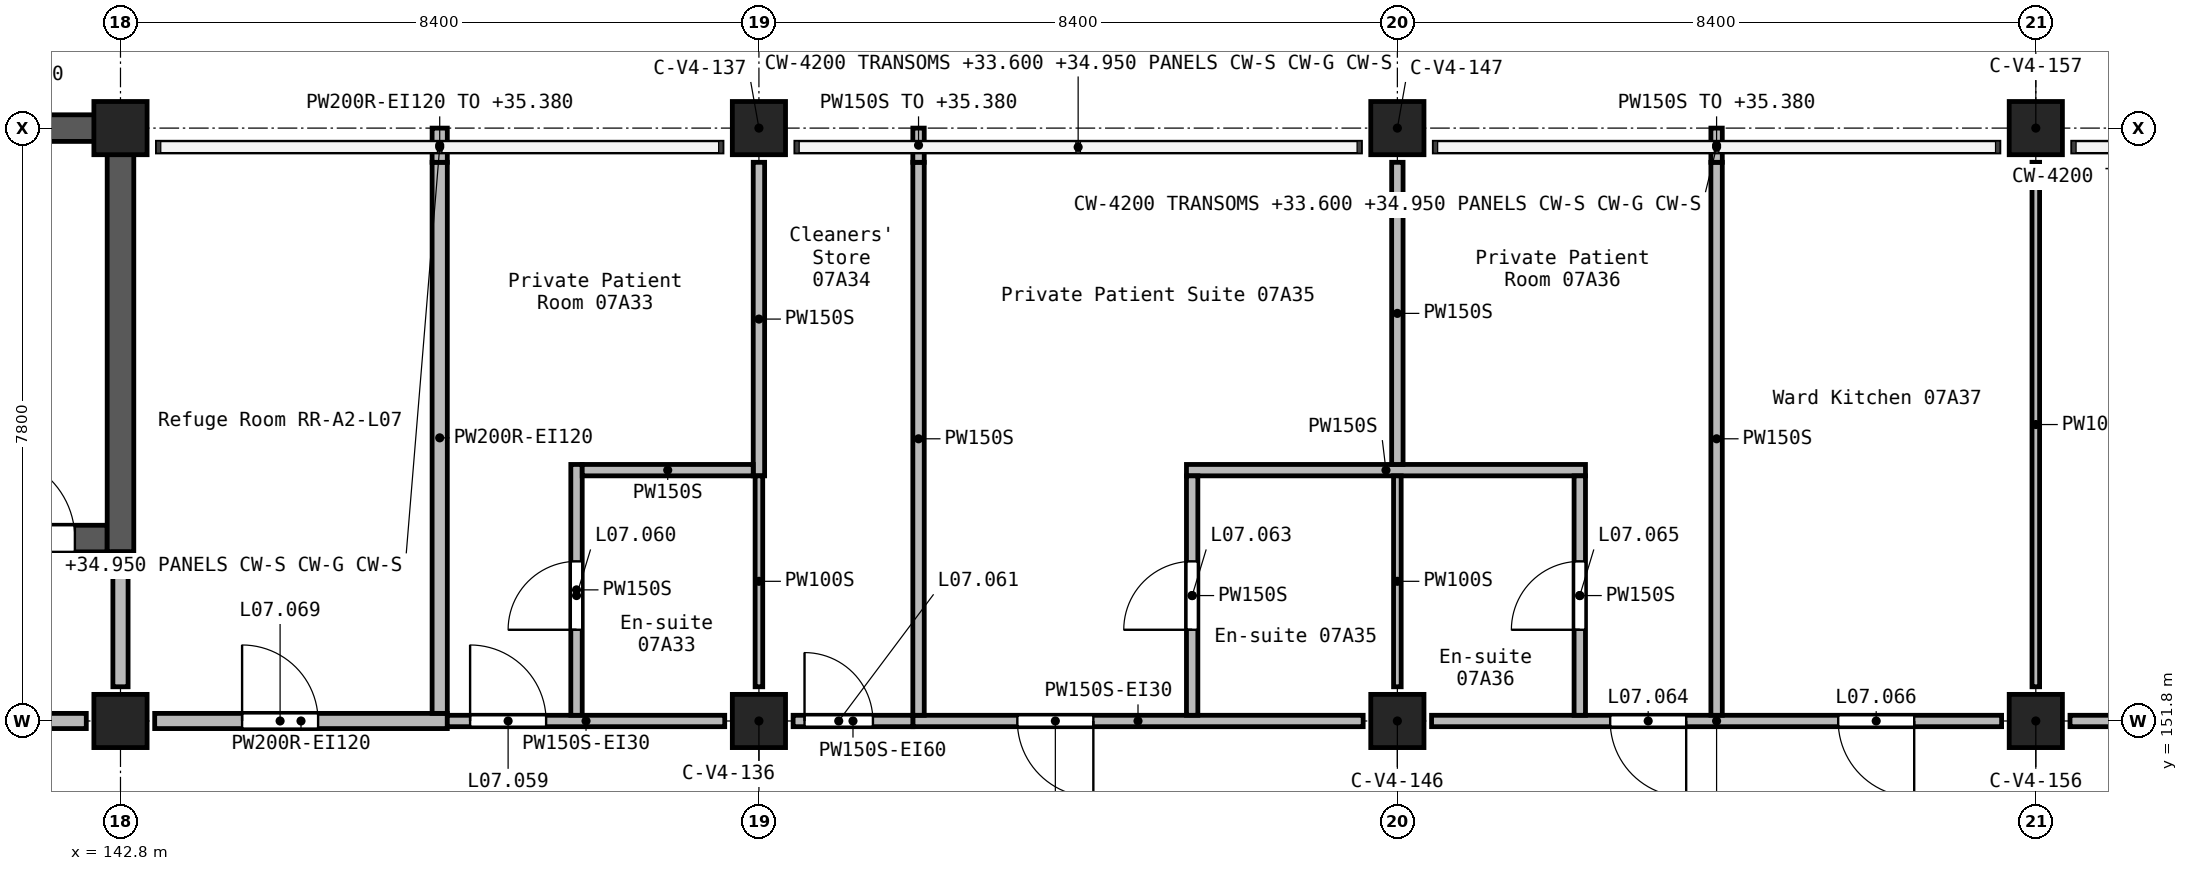
"""IFC4 building model, lengths in metres.
Left out: names, types, materials, properties, quantities, classifications, styles, units other than length and angle.
Written with IfcOpenShell. Run it as: python <this file> out.ifc"""

import sys

from ifc_helpers import new_model, si_unit, direction, frame, frame_2d, origin, origin_2d, place, context, subcontext, project, spatial, rectangle, extrude, element, fill, save


model = new_model("IFC4")
c1 = context("Model", 3, precision=1e-05, world=origin(), true_north=direction((0.0, 1.0)))
c2 = subcontext(c1, "Body", "Model", "MODEL_VIEW")
j1 = project(units=[si_unit("LENGTHUNIT", "METRE"), si_unit("PLANEANGLEUNIT", "RADIAN")], contexts=[c1])
p1 = place(None, origin())
s1 = spatial("IfcSite", under=j1, at=p1, CompositionType="ELEMENT")
p2 = place(p1, origin())
s2 = spatial("IfcBuilding", under=s1, at=p2, CompositionType="ELEMENT")
p3 = place(p2, frame((0.0, 0.0, 32.7)))
s3 = spatial("IfcBuildingStorey", under=s2, at=p3, CompositionType="ELEMENT", Elevation=32.7)
for number, where, z_axis, x_axis in (
    (1, (142.8, 151.8, 0.0), (0.0, 0.0, 1.0), (1.0, 0.0, 0.0)),
    (2, (142.8, 159.6, 0.0), (0.0, 0.0, 1.0), (1.0, 0.0, 0.0)),
    (3, (151.2, 151.8, 0.0), (0.0, 0.0, 1.0), (1.0, 0.0, 0.0)),
    (4, (151.2, 159.6, 0.0), (0.0, 0.0, 1.0), (1.0, 0.0, 0.0)),
    (5, (159.6, 151.8, 0.0), (0.0, 0.0, 1.0), (1.0, 0.0, 0.0)),
    (6, (159.6, 159.6, 0.0), (0.0, 0.0, 1.0), (1.0, 0.0, 0.0)),
    (7, (168.0, 151.8, 0.0), (0.0, 0.0, 1.0), (1.0, 0.0, 0.0)),
    (8, (168.0, 159.6, 0.0), (0.0, 0.0, 1.0), (1.0, 0.0, 0.0)),
):
    element("IfcColumn", number, at=place(p3, frame(where, z_axis=z_axis, x_axis=x_axis)), inside=s3, PredefinedType="COLUMN", context=c2, shape_type="SweptSolid", body=[
        extrude(rectangle(XDim=0.7, YDim=0.7, at=origin_2d()), origin(), (0.0, 0.0, 1.0), 3.9),
    ])
p4 = place(p3, frame((134.225, 159.6, 0.0), z_axis=(0.0, 0.0, 1.0), x_axis=(1.0, 0.0, 0.0)))
e9 = element("IfcWall", 9, at=p4, inside=s3, PredefinedType="SHEAR", context=c2, shape_type="SweptSolid", body=[
    extrude(rectangle(XDim=8.4, YDim=0.35, at=frame_2d((4.2, 0.0))), origin(), (0.0, 0.0, 1.0), 3.9),
])
p5 = place(p3, frame((134.575, 154.2, 0.0), z_axis=(0.0, 0.0, 1.0), x_axis=(1.0, 0.0, 0.0)))
e10 = element("IfcWall", 10, at=p5, inside=s3, PredefinedType="SHEAR", context=c2, shape_type="SweptSolid", body=[
    extrude(rectangle(XDim=8.05, YDim=0.35, at=frame_2d((4.025, 0.0))), origin(), (0.0, 0.0, 1.0), 3.9),
])
p6 = place(p5, frame((6.525, 0.0, 0.0)))
e11 = element("IfcOpeningElement", 11, at=p6, cuts=e10, PredefinedType="OPENING", context=c2, shape_type="SweptSolid", body=[
    extrude(rectangle(XDim=1.1, YDim=2.1, at=frame_2d((0.55, 1.05))), frame((0.0, 0.185, 0.0), z_axis=(0.0, -1.0, 0.0), x_axis=(1.0, 0.0, 0.0)), (0.0, 0.0, 1.0), 0.37),
])
p7 = place(p3, frame((142.8, 154.025, 0.0), z_axis=(0.0, 0.0, 1.0), x_axis=(0.0, 1.0, 0.0)))
e12 = element("IfcWall", 12, at=p7, inside=s3, PredefinedType="SHEAR", context=c2, shape_type="SweptSolid", body=[
    extrude(rectangle(XDim=5.75, YDim=0.35, at=frame_2d((2.875, 0.0))), origin(), (0.0, 0.0, 1.0), 3.9),
])
p8 = place(p3, frame((134.85, 151.8, 0.0), z_axis=(0.0, 0.0, 1.0), x_axis=(1.0, 0.0, 0.0)))
e13 = element("IfcWall", 13, at=p8, inside=s3, PredefinedType="SOLIDWALL", context=c2, shape_type="SweptSolid", body=[
    extrude(rectangle(XDim=7.5, YDim=0.2, at=frame_2d((3.75, 0.0))), origin(), (0.0, 0.0, 1.0), 3.6),
])
p9 = place(p8, frame((3.2, 0.0, 0.0)))
e14 = element("IfcOpeningElement", 14, at=p9, cuts=e13, PredefinedType="OPENING", context=c2, shape_type="SweptSolid", body=[
    extrude(rectangle(XDim=1.1, YDim=2.1, at=frame_2d((0.55, 1.05))), frame((0.0, 0.11, 0.0), z_axis=(0.0, -1.0, 0.0), x_axis=(1.0, 0.0, 0.0)), (0.0, 0.0, 1.0), 0.22),
])
p10 = place(p3, frame((143.25, 151.8, 0.0), z_axis=(0.0, 0.0, 1.0), x_axis=(1.0, 0.0, 0.0)))
e15 = element("IfcWall", 15, at=p10, inside=s3, PredefinedType="SOLIDWALL", context=c2, shape_type="SweptSolid", body=[
    extrude(rectangle(XDim=3.85, YDim=0.2, at=frame_2d((1.925, 0.0))), origin(), (0.0, 0.0, 1.0), 3.6),
])
p11 = place(p10, frame((1.15, 0.0, 0.0)))
e16 = element("IfcOpeningElement", 16, at=p11, cuts=e15, PredefinedType="OPENING", context=c2, shape_type="SweptSolid", body=[
    extrude(rectangle(XDim=1.0, YDim=2.1, at=frame_2d((0.5, 1.05))), frame((0.0, 0.11, 0.0), z_axis=(0.0, -1.0, 0.0), x_axis=(1.0, 0.0, 0.0)), (0.0, 0.0, 1.0), 0.22),
])
p12 = place(p3, frame((142.8, 152.25, 0.0), z_axis=(0.0, 0.0, 1.0), x_axis=(0.0, 1.0, 0.0)))
e17 = element("IfcWall", 17, at=p12, inside=s3, PredefinedType="SOLIDWALL", context=c2, shape_type="SweptSolid", body=[
    extrude(rectangle(XDim=1.775, YDim=0.2, at=frame_2d((0.887, 0.0))), origin(), (0.0, 0.0, 1.0), 3.6),
])
p13 = place(p3, frame((147.0, 151.9, 0.0), z_axis=(0.0, 0.0, 1.0), x_axis=(0.0, 1.0, 0.0)))
e18 = element("IfcWall", 18, at=p13, inside=s3, PredefinedType="SOLIDWALL", context=c2, shape_type="SweptSolid", body=[
    extrude(rectangle(XDim=7.25, YDim=0.2, at=frame_2d((3.625, 0.0))), origin(), (0.0, 0.0, 1.0), 3.6),
])
p14 = place(p3, frame((147.0, 159.15, 0.0), z_axis=(0.0, 0.0, 1.0), x_axis=(0.0, 1.0, 0.0)))
e19 = element("IfcWall", 19, at=p14, inside=s3, PredefinedType="SOLIDWALL", context=c2, shape_type="SweptSolid", body=[
    extrude(rectangle(XDim=0.45, YDim=0.2, at=frame_2d((0.225, 0.0))), origin(), (0.0, 0.0, 1.0), 2.68),
])
p15 = place(p3, frame((175.95, 151.8, 0.0), z_axis=(0.0, 0.0, 1.0), x_axis=(-1.0, 0.0, 0.0)))
e20 = element("IfcWall", 20, at=p15, inside=s3, PredefinedType="PARTITIONING", context=c2, shape_type="SweptSolid", body=[
    extrude(rectangle(XDim=7.5, YDim=0.15, at=frame_2d((3.75, 0.0))), origin(), (0.0, 0.0, 1.0), 3.6),
])
p16 = place(p15, frame((3.25, 0.0, 0.0)))
e21 = element("IfcOpeningElement", 21, at=p16, cuts=e20, PredefinedType="OPENING", context=c2, shape_type="SweptSolid", body=[
    extrude(rectangle(XDim=1.0, YDim=2.1, at=frame_2d((0.5, 1.05))), frame((0.0, 0.085, 0.0), z_axis=(0.0, -1.0, 0.0), x_axis=(1.0, 0.0, 0.0)), (0.0, 0.0, 1.0), 0.17),
])
p17 = place(p3, frame((167.55, 151.8, 0.0), z_axis=(0.0, 0.0, 1.0), x_axis=(-1.0, 0.0, 0.0)))
e22 = element("IfcWall", 22, at=p17, inside=s3, PredefinedType="PARTITIONING", context=c2, shape_type="SweptSolid", body=[
    extrude(rectangle(XDim=7.5, YDim=0.15, at=frame_2d((3.75, 0.0))), origin(), (0.0, 0.0, 1.0), 3.6),
])
p18 = place(p17, frame((4.15, 0.0, 0.0)))
e23 = element("IfcOpeningElement", 23, at=p18, cuts=e22, PredefinedType="OPENING", context=c2, shape_type="SweptSolid", body=[
    extrude(rectangle(XDim=1.0, YDim=2.1, at=frame_2d((0.5, 1.05))), frame((0.0, 0.085, 0.0), z_axis=(0.0, -1.0, 0.0), x_axis=(1.0, 0.0, 0.0)), (0.0, 0.0, 1.0), 0.17),
])
p19 = place(p17, frame((1.15, 0.0, 0.0)))
e24 = element("IfcOpeningElement", 24, at=p19, cuts=e22, PredefinedType="OPENING", context=c2, shape_type="SweptSolid", body=[
    extrude(rectangle(XDim=1.0, YDim=2.1, at=frame_2d((0.5, 1.05))), frame((0.0, 0.085, 0.0), z_axis=(0.0, -1.0, 0.0), x_axis=(1.0, 0.0, 0.0)), (0.0, 0.0, 1.0), 0.17),
])
p20 = place(p3, frame((159.15, 151.8, 0.0), z_axis=(0.0, 0.0, 1.0), x_axis=(-1.0, 0.0, 0.0)))
e25 = element("IfcWall", 25, at=p20, inside=s3, PredefinedType="PARTITIONING", context=c2, shape_type="SweptSolid", body=[
    extrude(rectangle(XDim=5.925, YDim=0.15, at=frame_2d((2.962, 0.0))), origin(), (0.0, 0.0, 1.0), 3.6),
])
p21 = place(p20, frame((3.55, 0.0, 0.0)))
e26 = element("IfcOpeningElement", 26, at=p21, cuts=e25, PredefinedType="OPENING", context=c2, shape_type="SweptSolid", body=[
    extrude(rectangle(XDim=1.0, YDim=2.1, at=frame_2d((0.5, 1.05))), frame((0.0, 0.085, 0.0), z_axis=(0.0, -1.0, 0.0), x_axis=(1.0, 0.0, 0.0)), (0.0, 0.0, 1.0), 0.17),
])
p22 = place(p3, frame((147.1, 151.8, 0.0), z_axis=(0.0, 0.0, 1.0), x_axis=(1.0, 0.0, 0.0)))
e27 = element("IfcWall", 27, at=p22, inside=s3, PredefinedType="PARTITIONING", context=c2, shape_type="SweptSolid", body=[
    extrude(rectangle(XDim=3.65, YDim=0.15, at=frame_2d((1.825, 0.0))), origin(), (0.0, 0.0, 1.0), 3.6),
])
p23 = place(p22, frame((0.3, 0.0, 0.0)))
e28 = element("IfcOpeningElement", 28, at=p23, cuts=e27, PredefinedType="OPENING", context=c2, shape_type="SweptSolid", body=[
    extrude(rectangle(XDim=1.0, YDim=2.1, at=frame_2d((0.5, 1.05))), frame((0.0, 0.085, 0.0), z_axis=(0.0, -1.0, 0.0), x_axis=(1.0, 0.0, 0.0)), (0.0, 0.0, 1.0), 0.17),
])
p24 = place(p3, frame((151.65, 151.8, 0.0), z_axis=(0.0, 0.0, 1.0), x_axis=(1.0, 0.0, 0.0)))
e29 = element("IfcWall", 29, at=p24, inside=s3, PredefinedType="PARTITIONING", context=c2, shape_type="SweptSolid", body=[
    extrude(rectangle(XDim=1.575, YDim=0.15, at=frame_2d((0.788, 0.0))), origin(), (0.0, 0.0, 1.0), 3.6),
])
p25 = place(p24, frame((0.15, 0.0, 0.0)))
e30 = element("IfcOpeningElement", 30, at=p25, cuts=e29, PredefinedType="OPENING", context=c2, shape_type="SweptSolid", body=[
    extrude(rectangle(XDim=0.9, YDim=2.1, at=frame_2d((0.45, 1.05))), frame((0.0, 0.085, 0.0), z_axis=(0.0, -1.0, 0.0), x_axis=(1.0, 0.0, 0.0)), (0.0, 0.0, 1.0), 0.17),
])
p26 = place(p3, frame((153.3, 151.875, 0.0), z_axis=(0.0, 0.0, 1.0), x_axis=(0.0, 1.0, 0.0)))
e31 = element("IfcWall", 31, at=p26, inside=s3, PredefinedType="PARTITIONING", context=c2, shape_type="SweptSolid", body=[
    extrude(rectangle(XDim=7.275, YDim=0.15, at=frame_2d((3.637, 0.0))), origin(), (0.0, 0.0, 1.0), 3.6),
])
p27 = place(p3, frame((153.3, 159.15, 0.0), z_axis=(0.0, 0.0, 1.0), x_axis=(0.0, 1.0, 0.0)))
e32 = element("IfcWall", 32, at=p27, inside=s3, PredefinedType="PARTITIONING", context=c2, shape_type="SweptSolid", body=[
    extrude(rectangle(XDim=0.45, YDim=0.15, at=frame_2d((0.225, 0.0))), origin(), (0.0, 0.0, 1.0), 2.68),
])
p28 = place(p3, frame((163.8, 151.875, 0.0), z_axis=(0.0, 0.0, 1.0), x_axis=(0.0, 1.0, 0.0)))
e33 = element("IfcWall", 33, at=p28, inside=s3, PredefinedType="PARTITIONING", context=c2, shape_type="SweptSolid", body=[
    extrude(rectangle(XDim=7.275, YDim=0.15, at=frame_2d((3.637, 0.0))), origin(), (0.0, 0.0, 1.0), 3.6),
])
p29 = place(p3, frame((163.8, 159.15, 0.0), z_axis=(0.0, 0.0, 1.0), x_axis=(0.0, 1.0, 0.0)))
e34 = element("IfcWall", 34, at=p29, inside=s3, PredefinedType="PARTITIONING", context=c2, shape_type="SweptSolid", body=[
    extrude(rectangle(XDim=0.45, YDim=0.15, at=frame_2d((0.225, 0.0))), origin(), (0.0, 0.0, 1.0), 2.68),
])
p30 = place(p3, frame((156.825, 155.1, 0.0), z_axis=(0.0, 0.0, 1.0), x_axis=(1.0, 0.0, 0.0)))
e35 = element("IfcWall", 35, at=p30, inside=s3, PredefinedType="PARTITIONING", context=c2, shape_type="SweptSolid", body=[
    extrude(rectangle(XDim=5.25, YDim=0.15, at=frame_2d((2.625, 0.0))), origin(), (0.0, 0.0, 1.0), 3.6),
])
p31 = place(p3, frame((151.2, 155.025, 0.0), z_axis=(0.0, 0.0, 1.0), x_axis=(0.0, 1.0, 0.0)))
e36 = element("IfcWall", 36, at=p31, inside=s3, PredefinedType="PARTITIONING", context=c2, shape_type="SweptSolid", body=[
    extrude(rectangle(XDim=4.125, YDim=0.15, at=frame_2d((2.062, 0.0))), origin(), (0.0, 0.0, 1.0), 3.6),
])
p32 = place(p3, frame((159.6, 155.175, 0.0), z_axis=(0.0, 0.0, 1.0), x_axis=(0.0, 1.0, 0.0)))
e37 = element("IfcWall", 37, at=p32, inside=s3, PredefinedType="PARTITIONING", context=c2, shape_type="SweptSolid", body=[
    extrude(rectangle(XDim=3.975, YDim=0.15, at=frame_2d((1.987, 0.0))), origin(), (0.0, 0.0, 1.0), 3.6),
])
p33 = place(p3, frame((148.8, 151.875, 0.0), z_axis=(0.0, 0.0, 1.0), x_axis=(0.0, 1.0, 0.0)))
e38 = element("IfcWall", 38, at=p33, inside=s3, PredefinedType="PARTITIONING", context=c2, shape_type="SweptSolid", body=[
    extrude(rectangle(XDim=3.3, YDim=0.15, at=frame_2d((1.65, 0.0))), origin(), (0.0, 0.0, 1.0), 3.6),
])
p34 = place(p33, frame((1.125, 0.0, 0.0)))
e39 = element("IfcOpeningElement", 39, at=p34, cuts=e38, PredefinedType="OPENING", context=c2, shape_type="SweptSolid", body=[
    extrude(rectangle(XDim=0.9, YDim=2.1, at=frame_2d((0.45, 1.05))), frame((0.0, 0.085, 0.0), z_axis=(0.0, -1.0, 0.0), x_axis=(1.0, 0.0, 0.0)), (0.0, 0.0, 1.0), 0.17),
])
p35 = place(p3, frame((156.9, 151.875, 0.0), z_axis=(0.0, 0.0, 1.0), x_axis=(0.0, 1.0, 0.0)))
e40 = element("IfcWall", 40, at=p35, inside=s3, PredefinedType="PARTITIONING", context=c2, shape_type="SweptSolid", body=[
    extrude(rectangle(XDim=3.15, YDim=0.15, at=frame_2d((1.575, 0.0))), origin(), (0.0, 0.0, 1.0), 3.6),
])
p36 = place(p35, frame((1.125, 0.0, 0.0)))
e41 = element("IfcOpeningElement", 41, at=p36, cuts=e40, PredefinedType="OPENING", context=c2, shape_type="SweptSolid", body=[
    extrude(rectangle(XDim=0.9, YDim=2.1, at=frame_2d((0.45, 1.05))), frame((0.0, 0.085, 0.0), z_axis=(0.0, -1.0, 0.0), x_axis=(1.0, 0.0, 0.0)), (0.0, 0.0, 1.0), 0.17),
])
p37 = place(p3, frame((162.0, 151.875, 0.0), z_axis=(0.0, 0.0, 1.0), x_axis=(0.0, 1.0, 0.0)))
e42 = element("IfcWall", 42, at=p37, inside=s3, PredefinedType="PARTITIONING", context=c2, shape_type="SweptSolid", body=[
    extrude(rectangle(XDim=3.15, YDim=0.15, at=frame_2d((1.575, 0.0))), origin(), (0.0, 0.0, 1.0), 3.6),
])
p38 = place(p37, frame((1.125, 0.0, 0.0)))
e43 = element("IfcOpeningElement", 43, at=p38, cuts=e42, PredefinedType="OPENING", context=c2, shape_type="SweptSolid", body=[
    extrude(rectangle(XDim=0.9, YDim=2.1, at=frame_2d((0.45, 1.05))), frame((0.0, 0.085, 0.0), z_axis=(0.0, -1.0, 0.0), x_axis=(1.0, 0.0, 0.0)), (0.0, 0.0, 1.0), 0.17),
])
p39 = place(p3, frame((148.875, 155.1, 0.0), z_axis=(0.0, 0.0, 1.0), x_axis=(1.0, 0.0, 0.0)))
e44 = element("IfcWall", 44, at=p39, inside=s3, PredefinedType="PARTITIONING", context=c2, shape_type="SweptSolid", body=[
    extrude(rectangle(XDim=2.25, YDim=0.15, at=frame_2d((1.125, 0.0))), origin(), (0.0, 0.0, 1.0), 3.6),
])
p40 = place(p3, frame((168.0, 152.25, 0.0), z_axis=(0.0, 0.0, 1.0), x_axis=(0.0, 1.0, 0.0)))
e45 = element("IfcWall", 45, at=p40, inside=s3, PredefinedType="PARTITIONING", context=c2, shape_type="SweptSolid", body=[
    extrude(rectangle(XDim=6.9, YDim=0.1, at=frame_2d((3.45, 0.0))), origin(), (0.0, 0.0, 1.0), 3.6),
])
for number, where, z_axis, x_axis in (
    (46, (151.2, 152.25, 0.0), (0.0, 0.0, 1.0), (0.0, 1.0, 0.0)),
    (47, (159.6, 152.25, 0.0), (0.0, 0.0, 1.0), (0.0, 1.0, 0.0)),
):
    element("IfcWall", number, at=place(p3, frame(where, z_axis=z_axis, x_axis=x_axis)), inside=s3, PredefinedType="PARTITIONING", context=c2, shape_type="SweptSolid", body=[
        extrude(rectangle(XDim=2.775, YDim=0.1, at=frame_2d((1.387, 0.0))), origin(), (0.0, 0.0, 1.0), 3.6),
    ])
p41 = place(p23, origin())
e48 = element("IfcDoor", 48, at=p41, inside=s3, OperationType="SINGLE_SWING_LEFT", PredefinedType="DOOR", context=c2, shape_type="SweptSolid", body=[
    extrude(rectangle(XDim=1.0, YDim=2.1, at=frame_2d((0.5, 1.05))), frame((0.0, 0.025, 0.0), z_axis=(0.0, -1.0, 0.0), x_axis=(1.0, 0.0, 0.0)), (0.0, 0.0, 1.0), 0.05),
])
fill(e28, e48)
p42 = place(p34, frame((0.9, 0.0, 0.0), z_axis=(0.0, 0.0, 1.0), x_axis=(-1.0, 0.0, 0.0)))
e49 = element("IfcDoor", 49, at=p42, inside=s3, OperationType="SINGLE_SWING_RIGHT", PredefinedType="DOOR", context=c2, shape_type="SweptSolid", body=[
    extrude(rectangle(XDim=0.9, YDim=2.1, at=frame_2d((0.45, 1.05))), frame((0.0, 0.025, 0.0), z_axis=(0.0, -1.0, 0.0), x_axis=(1.0, 0.0, 0.0)), (0.0, 0.0, 1.0), 0.05),
])
fill(e39, e49)
p43 = place(p25, origin())
e50 = element("IfcDoor", 50, at=p43, inside=s3, OperationType="SINGLE_SWING_LEFT", PredefinedType="DOOR", context=c2, shape_type="SweptSolid", body=[
    extrude(rectangle(XDim=0.9, YDim=2.1, at=frame_2d((0.45, 1.05))), frame((0.0, 0.025, 0.0), z_axis=(0.0, -1.0, 0.0), x_axis=(1.0, 0.0, 0.0)), (0.0, 0.0, 1.0), 0.05),
])
fill(e30, e50)
p44 = place(p21, frame((1.0, 0.0, 0.0), z_axis=(0.0, 0.0, 1.0), x_axis=(-1.0, 0.0, 0.0)))
e51 = element("IfcDoor", 51, at=p44, inside=s3, OperationType="SINGLE_SWING_LEFT", PredefinedType="DOOR", context=c2, shape_type="SweptSolid", body=[
    extrude(rectangle(XDim=1.0, YDim=2.1, at=frame_2d((0.5, 1.05))), frame((0.0, 0.025, 0.0), z_axis=(0.0, -1.0, 0.0), x_axis=(1.0, 0.0, 0.0)), (0.0, 0.0, 1.0), 0.05),
])
fill(e26, e51)
p45 = place(p36, frame((0.9, 0.0, 0.0), z_axis=(0.0, 0.0, 1.0), x_axis=(-1.0, 0.0, 0.0)))
e52 = element("IfcDoor", 52, at=p45, inside=s3, OperationType="SINGLE_SWING_LEFT", PredefinedType="DOOR", context=c2, shape_type="SweptSolid", body=[
    extrude(rectangle(XDim=0.9, YDim=2.1, at=frame_2d((0.45, 1.05))), frame((0.0, 0.025, 0.0), z_axis=(0.0, -1.0, 0.0), x_axis=(1.0, 0.0, 0.0)), (0.0, 0.0, 1.0), 0.05),
])
fill(e41, e52)
p46 = place(p18, frame((1.0, 0.0, 0.0), z_axis=(0.0, 0.0, 1.0), x_axis=(-1.0, 0.0, 0.0)))
e53 = element("IfcDoor", 53, at=p46, inside=s3, OperationType="SINGLE_SWING_LEFT", PredefinedType="DOOR", context=c2, shape_type="SweptSolid", body=[
    extrude(rectangle(XDim=1.0, YDim=2.1, at=frame_2d((0.5, 1.05))), frame((0.0, 0.025, 0.0), z_axis=(0.0, -1.0, 0.0), x_axis=(1.0, 0.0, 0.0)), (0.0, 0.0, 1.0), 0.05),
])
fill(e23, e53)
p47 = place(p38, origin())
e54 = element("IfcDoor", 54, at=p47, inside=s3, OperationType="SINGLE_SWING_RIGHT", PredefinedType="DOOR", context=c2, shape_type="SweptSolid", body=[
    extrude(rectangle(XDim=0.9, YDim=2.1, at=frame_2d((0.45, 1.05))), frame((0.0, 0.025, 0.0), z_axis=(0.0, -1.0, 0.0), x_axis=(1.0, 0.0, 0.0)), (0.0, 0.0, 1.0), 0.05),
])
fill(e43, e54)
p48 = place(p19, frame((1.0, 0.0, 0.0), z_axis=(0.0, 0.0, 1.0), x_axis=(-1.0, 0.0, 0.0)))
e55 = element("IfcDoor", 55, at=p48, inside=s3, OperationType="SINGLE_SWING_RIGHT", PredefinedType="DOOR", context=c2, shape_type="SweptSolid", body=[
    extrude(rectangle(XDim=1.0, YDim=2.1, at=frame_2d((0.5, 1.05))), frame((0.0, 0.025, 0.0), z_axis=(0.0, -1.0, 0.0), x_axis=(1.0, 0.0, 0.0)), (0.0, 0.0, 1.0), 0.05),
])
fill(e24, e55)
p49 = place(p11, origin())
e56 = element("IfcDoor", 56, at=p49, inside=s3, OperationType="SINGLE_SWING_LEFT", PredefinedType="DOOR", context=c2, shape_type="SweptSolid", body=[
    extrude(rectangle(XDim=1.0, YDim=2.1, at=frame_2d((0.5, 1.05))), frame((0.0, 0.025, 0.0), z_axis=(0.0, -1.0, 0.0), x_axis=(1.0, 0.0, 0.0)), (0.0, 0.0, 1.0), 0.05),
])
fill(e16, e56)
p50 = place(p6, origin())
e57 = element("IfcDoor", 57, at=p50, inside=s3, OperationType="SINGLE_SWING_RIGHT", PredefinedType="DOOR", context=c2, shape_type="SweptSolid", body=[
    extrude(rectangle(XDim=1.1, YDim=2.1, at=frame_2d((0.55, 1.05))), frame((0.0, 0.025, 0.0), z_axis=(0.0, -1.0, 0.0), x_axis=(1.0, 0.0, 0.0)), (0.0, 0.0, 1.0), 0.05),
])
fill(e11, e57)
save(model, sys.argv[1])
